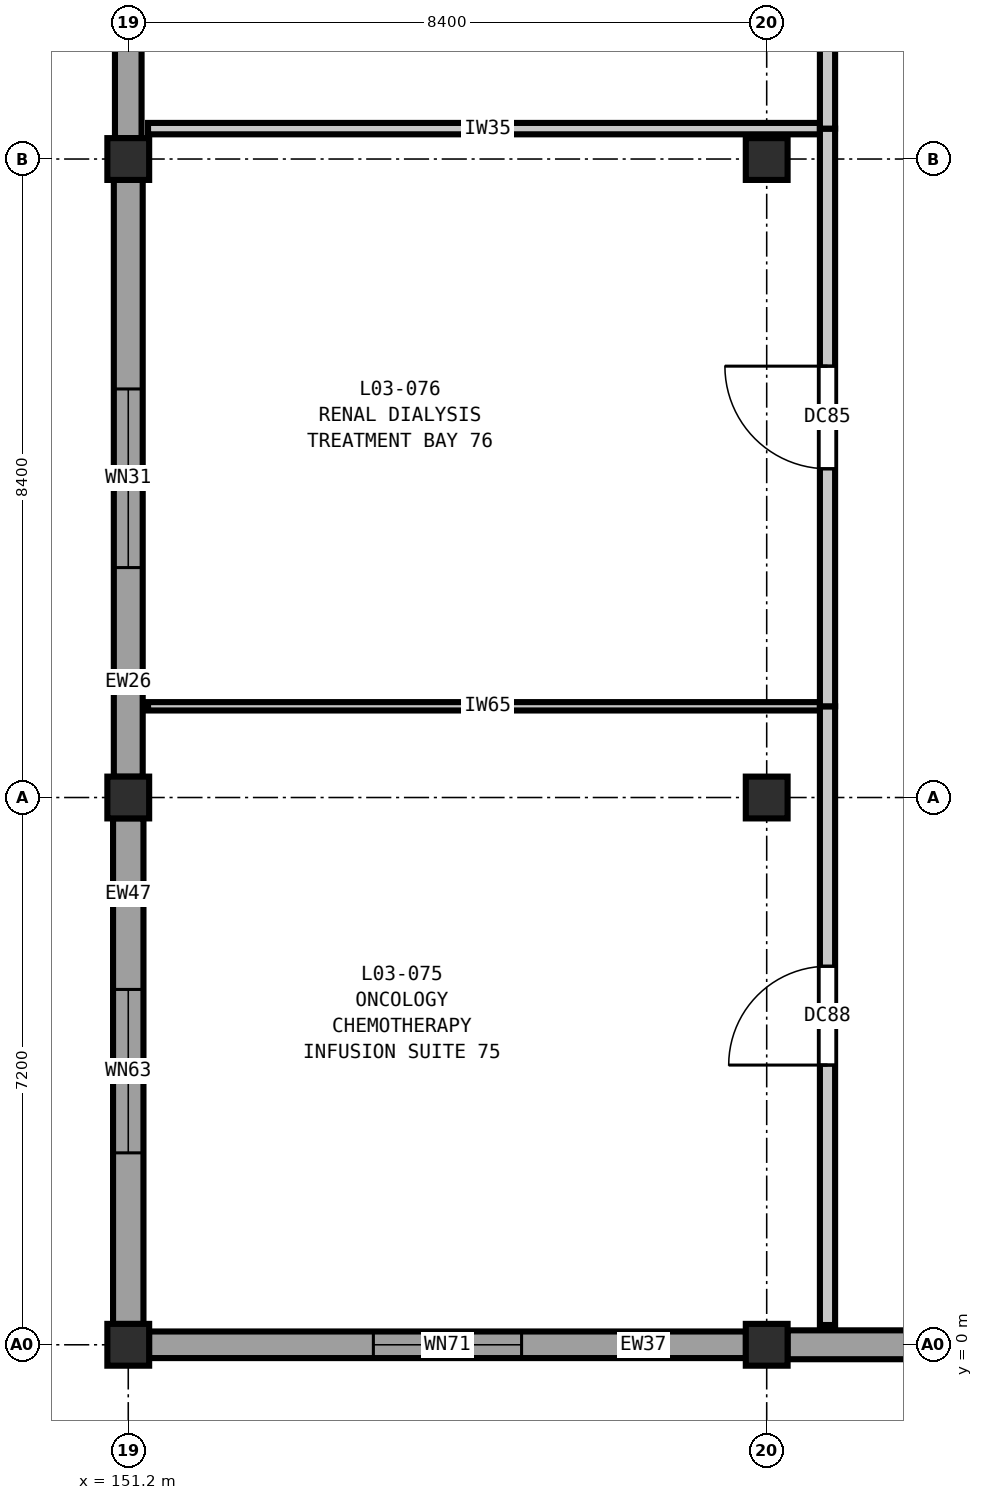
"""IFC4 building model, lengths in metres.
Left out: names, types, materials, properties, quantities, classifications, styles, units other than length and angle.
Written with IfcOpenShell. Run it as: python <this file> out.ifc"""

import sys

from ifc_helpers import new_model, si_unit, direction, frame, frame_2d, origin, origin_2d, place, context, subcontext, project, spatial, rectangle, extrude, element, fill, save


model = new_model("IFC4")
c1 = context("Model", 3, precision=1e-05, world=origin(), true_north=direction((0.0, 1.0)))
c2 = subcontext(c1, "Body", "Model", "MODEL_VIEW")
j1 = project(units=[si_unit("LENGTHUNIT", "METRE"), si_unit("PLANEANGLEUNIT", "RADIAN")], contexts=[c1])
p1 = place(None, origin())
s1 = spatial("IfcSite", under=j1, at=p1, CompositionType="ELEMENT")
p2 = place(p1, origin())
s2 = spatial("IfcBuilding", under=s1, at=p2, CompositionType="ELEMENT")
p3 = place(p2, frame((0.0, 0.0, 16.2)))
s3 = spatial("IfcBuildingStorey", under=s2, at=p3, CompositionType="ELEMENT", Elevation=16.2)
for number, where, z_axis, x_axis in (
    (1, (151.2, 0.0, 0.0), (0.0, 0.0, 1.0), (1.0, 0.0, 0.0)),
    (2, (151.2, 7.2, 0.0), (0.0, 0.0, 1.0), (1.0, 0.0, 0.0)),
    (3, (151.2, 15.6, 0.0), (0.0, 0.0, 1.0), (1.0, 0.0, 0.0)),
    (4, (159.6, 0.0, 0.0), (0.0, 0.0, 1.0), (1.0, 0.0, 0.0)),
    (5, (159.6, 7.2, 0.0), (0.0, 0.0, 1.0), (1.0, 0.0, 0.0)),
    (6, (159.6, 15.6, 0.0), (0.0, 0.0, 1.0), (1.0, 0.0, 0.0)),
):
    element("IfcColumn", number, at=place(p3, frame(where, z_axis=z_axis, x_axis=x_axis)), inside=s3, PredefinedType="COLUMN", context=c2, shape_type="SweptSolid", body=[
        extrude(rectangle(XDim=0.55, YDim=0.55, at=origin_2d()), origin(), (0.0, 0.0, 1.0), 4.2),
    ])
p4 = place(p3, frame((167.727, 0.0, 0.0), z_axis=(0.0, 0.0, 1.0), x_axis=(-1.0, 0.0, 0.0)))
e7 = element("IfcWall", 7, at=p4, inside=s3, PredefinedType="SOLIDWALL", context=c2, shape_type="SweptSolid", body=[
    extrude(rectangle(XDim=7.854, YDim=0.38, at=frame_2d((3.927, 0.0))), origin(), (0.0, 0.0, 1.0), 3.48),
])
p5 = place(p4, frame((1.907, 0.0, 0.9)))
e8 = element("IfcOpeningElement", 8, at=p5, cuts=e7, PredefinedType="OPENING", context=c2, shape_type="SweptSolid", body=[
    extrude(rectangle(XDim=1.75, YDim=1.75, at=frame_2d((0.875, 0.875))), frame((0.0, 0.2, 0.0), z_axis=(0.0, -1.0, 0.0), x_axis=(1.0, 0.0, 0.0)), (0.0, 0.0, 1.0), 0.4),
])
p6 = place(p3, frame((159.327, 0.0, 0.0), z_axis=(0.0, 0.0, 1.0), x_axis=(-1.0, 0.0, 0.0)))
e9 = element("IfcWall", 9, at=p6, inside=s3, PredefinedType="SOLIDWALL", context=c2, shape_type="SweptSolid", body=[
    extrude(rectangle(XDim=7.854, YDim=0.35, at=frame_2d((3.927, 0.0))), origin(), (0.0, 0.0, 1.0), 3.48),
])
p7 = place(p6, frame((2.952, 0.0, 0.9)))
e10 = element("IfcOpeningElement", 10, at=p7, cuts=e9, PredefinedType="OPENING", context=c2, shape_type="SweptSolid", body=[
    extrude(rectangle(XDim=1.95, YDim=1.75, at=frame_2d((0.975, 0.875))), frame((0.0, 0.185, 0.0), z_axis=(0.0, -1.0, 0.0), x_axis=(1.0, 0.0, 0.0)), (0.0, 0.0, 1.0), 0.37),
])
p8 = place(p3, frame((151.2, 0.273, 0.0), z_axis=(0.0, 0.0, 1.0), x_axis=(0.0, 1.0, 0.0)))
e11 = element("IfcWall", 11, at=p8, inside=s3, PredefinedType="SOLIDWALL", context=c2, shape_type="SweptSolid", body=[
    extrude(rectangle(XDim=6.654, YDim=0.4, at=frame_2d((3.327, 0.0))), origin(), (0.0, 0.0, 1.0), 3.48),
])
p9 = place(p8, frame((2.252, 0.0, 0.9)))
e12 = element("IfcOpeningElement", 12, at=p9, cuts=e11, PredefinedType="OPENING", context=c2, shape_type="SweptSolid", body=[
    extrude(rectangle(XDim=2.15, YDim=1.75, at=frame_2d((1.075, 0.875))), frame((0.0, 0.21, 0.0), z_axis=(0.0, -1.0, 0.0), x_axis=(1.0, 0.0, 0.0)), (0.0, 0.0, 1.0), 0.42),
])
p10 = place(p3, frame((151.2, 7.473, 0.0), z_axis=(0.0, 0.0, 1.0), x_axis=(0.0, 1.0, 0.0)))
e13 = element("IfcWall", 13, at=p10, inside=s3, PredefinedType="SOLIDWALL", context=c2, shape_type="SweptSolid", body=[
    extrude(rectangle(XDim=7.854, YDim=0.38, at=frame_2d((3.927, 0.0))), origin(), (0.0, 0.0, 1.0), 3.48),
])
p11 = place(p10, frame((2.752, 0.0, 0.9)))
e14 = element("IfcOpeningElement", 14, at=p11, cuts=e13, PredefinedType="OPENING", context=c2, shape_type="SweptSolid", body=[
    extrude(rectangle(XDim=2.35, YDim=1.75, at=frame_2d((1.175, 0.875))), frame((0.0, 0.2, 0.0), z_axis=(0.0, -1.0, 0.0), x_axis=(1.0, 0.0, 0.0)), (0.0, 0.0, 1.0), 0.4),
])
p12 = place(p3, frame((151.2, 15.873, 0.0), z_axis=(0.0, 0.0, 1.0), x_axis=(0.0, 1.0, 0.0)))
e15 = element("IfcWall", 15, at=p12, inside=s3, PredefinedType="SOLIDWALL", context=c2, shape_type="SweptSolid", body=[
    extrude(rectangle(XDim=7.854, YDim=0.35, at=frame_2d((3.927, 0.0))), origin(), (0.0, 0.0, 1.0), 3.48),
])
p13 = place(p12, frame((3.377, 0.0, 0.9)))
e16 = element("IfcOpeningElement", 16, at=p13, cuts=e15, PredefinedType="OPENING", context=c2, shape_type="SweptSolid", body=[
    extrude(rectangle(XDim=1.1, YDim=1.95, at=frame_2d((0.55, 0.975))), frame((0.0, 0.185, 0.0), z_axis=(0.0, -1.0, 0.0), x_axis=(1.0, 0.0, 0.0)), (0.0, 0.0, 1.0), 0.37),
])
p14 = place(p3, frame((151.46, 8.4, 0.0), z_axis=(0.0, 0.0, 1.0), x_axis=(1.0, 0.0, 0.0)))
e17 = element("IfcWall", 17, at=p14, inside=s3, PredefinedType="PARTITIONING", context=c2, shape_type="SweptSolid", body=[
    extrude(rectangle(XDim=8.94, YDim=0.11, at=frame_2d((4.47, 0.0))), origin(), (0.0, 0.0, 1.0), 3.89),
])
p15 = place(p3, frame((151.46, 16.0, 0.0), z_axis=(0.0, 0.0, 1.0), x_axis=(1.0, 0.0, 0.0)))
e18 = element("IfcWall", 18, at=p15, inside=s3, PredefinedType="PARTITIONING", context=c2, shape_type="SweptSolid", body=[
    extrude(rectangle(XDim=8.94, YDim=0.15, at=frame_2d((4.47, 0.0))), origin(), (0.0, 0.0, 1.0), 3.89),
])
p16 = place(p3, frame((160.4, 0.26, 0.0), z_axis=(0.0, 0.0, 1.0), x_axis=(0.0, 1.0, 0.0)))
e19 = element("IfcWall", 19, at=p16, inside=s3, PredefinedType="PARTITIONING", context=c2, shape_type="SweptSolid", body=[
    extrude(rectangle(XDim=8.14, YDim=0.2, at=frame_2d((4.07, 0.0))), origin(), (0.0, 0.0, 1.0), 3.89),
])
p17 = place(p16, frame((3.42, 0.0, 0.0)))
e20 = element("IfcOpeningElement", 20, at=p17, cuts=e19, PredefinedType="OPENING", context=c2, shape_type="SweptSolid", body=[
    extrude(rectangle(XDim=1.3, YDim=2.2, at=frame_2d((0.65, 1.1))), frame((0.0, 0.11, 0.0), z_axis=(0.0, -1.0, 0.0), x_axis=(1.0, 0.0, 0.0)), (0.0, 0.0, 1.0), 0.22),
])
p18 = place(p3, frame((160.4, 8.4, 0.0), z_axis=(0.0, 0.0, 1.0), x_axis=(0.0, 1.0, 0.0)))
e21 = element("IfcWall", 21, at=p18, inside=s3, PredefinedType="PARTITIONING", context=c2, shape_type="SweptSolid", body=[
    extrude(rectangle(XDim=7.6, YDim=0.2, at=frame_2d((3.8, 0.0))), origin(), (0.0, 0.0, 1.0), 3.89),
])
p19 = place(p18, frame((3.125, 0.0, 0.0)))
e22 = element("IfcOpeningElement", 22, at=p19, cuts=e21, PredefinedType="OPENING", context=c2, shape_type="SweptSolid", body=[
    extrude(rectangle(XDim=1.35, YDim=2.2, at=frame_2d((0.675, 1.1))), frame((0.0, 0.11, 0.0), z_axis=(0.0, -1.0, 0.0), x_axis=(1.0, 0.0, 0.0)), (0.0, 0.0, 1.0), 0.22),
])
p20 = place(p3, frame((160.4, 16.0, 0.0), z_axis=(0.0, 0.0, 1.0), x_axis=(0.0, 1.0, 0.0)))
e23 = element("IfcWall", 23, at=p20, inside=s3, PredefinedType="PARTITIONING", context=c2, shape_type="SweptSolid", body=[
    extrude(rectangle(XDim=8.4, YDim=0.2, at=frame_2d((4.2, 0.0))), origin(), (0.0, 0.0, 1.0), 3.89),
])
p21 = place(p20, frame((3.475, 0.0, 0.0)))
e24 = element("IfcOpeningElement", 24, at=p21, cuts=e23, PredefinedType="OPENING", context=c2, shape_type="SweptSolid", body=[
    extrude(rectangle(XDim=1.45, YDim=2.25, at=frame_2d((0.725, 1.125))), frame((0.0, 0.11, 0.0), z_axis=(0.0, -1.0, 0.0), x_axis=(1.0, 0.0, 0.0)), (0.0, 0.0, 1.0), 0.22),
])
p22 = place(p7, origin())
e25 = element("IfcWindow", 25, at=p22, inside=s3, PartitioningType="DOUBLE_PANEL_VERTICAL", PredefinedType="WINDOW", context=c2, shape_type="SweptSolid", body=[
    extrude(rectangle(XDim=1.95, YDim=1.75, at=frame_2d((0.975, 0.875))), frame((0.0, 0.03, 0.0), z_axis=(0.0, -1.0, 0.0), x_axis=(1.0, 0.0, 0.0)), (0.0, 0.0, 1.0), 0.06),
])
fill(e10, e25)
p23 = place(p9, origin())
e26 = element("IfcWindow", 26, at=p23, inside=s3, PartitioningType="DOUBLE_PANEL_VERTICAL", PredefinedType="WINDOW", context=c2, shape_type="SweptSolid", body=[
    extrude(rectangle(XDim=2.15, YDim=1.75, at=frame_2d((1.075, 0.875))), frame((0.0, 0.03, 0.0), z_axis=(0.0, -1.0, 0.0), x_axis=(1.0, 0.0, 0.0)), (0.0, 0.0, 1.0), 0.06),
])
fill(e12, e26)
p24 = place(p11, origin())
e27 = element("IfcWindow", 27, at=p24, inside=s3, PartitioningType="DOUBLE_PANEL_VERTICAL", PredefinedType="WINDOW", context=c2, shape_type="SweptSolid", body=[
    extrude(rectangle(XDim=2.35, YDim=1.75, at=frame_2d((1.175, 0.875))), frame((0.0, 0.03, 0.0), z_axis=(0.0, -1.0, 0.0), x_axis=(1.0, 0.0, 0.0)), (0.0, 0.0, 1.0), 0.06),
])
fill(e14, e27)
p25 = place(p17, origin())
e28 = element("IfcDoor", 28, at=p25, inside=s3, OperationType="SINGLE_SWING_LEFT", PredefinedType="DOOR", context=c2, shape_type="SweptSolid", body=[
    extrude(rectangle(XDim=1.3, YDim=2.2, at=frame_2d((0.65, 1.1))), frame((0.0, 0.025, 0.0), z_axis=(0.0, -1.0, 0.0), x_axis=(1.0, 0.0, 0.0)), (0.0, 0.0, 1.0), 0.05),
])
fill(e20, e28)
p26 = place(p19, origin())
e29 = element("IfcDoor", 29, at=p26, inside=s3, OperationType="SINGLE_SWING_RIGHT", PredefinedType="DOOR", context=c2, shape_type="SweptSolid", body=[
    extrude(rectangle(XDim=1.35, YDim=2.2, at=frame_2d((0.675, 1.1))), frame((0.0, 0.025, 0.0), z_axis=(0.0, -1.0, 0.0), x_axis=(1.0, 0.0, 0.0)), (0.0, 0.0, 1.0), 0.05),
])
fill(e22, e29)
save(model, sys.argv[1])
